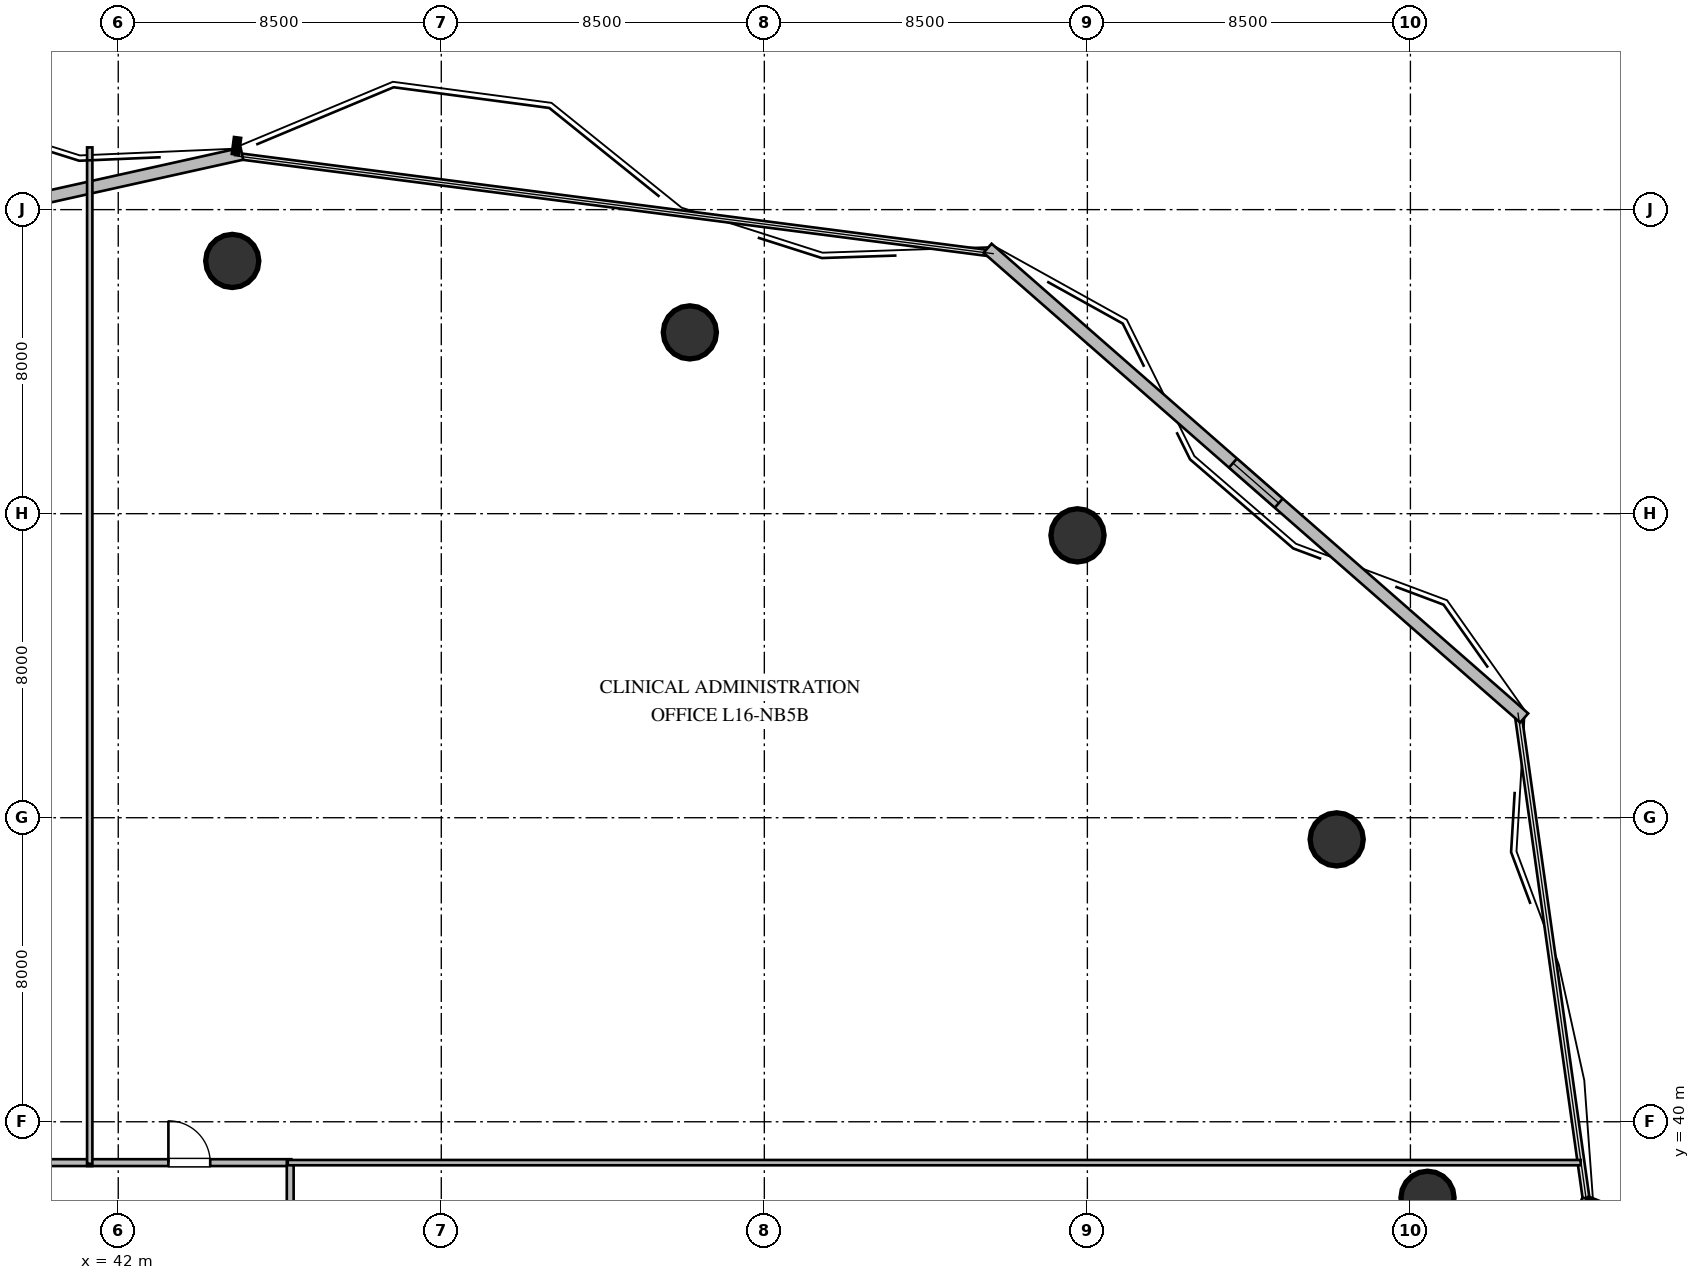
"""IFC4 building model, lengths in metres.
Left out: names, types, materials, properties, quantities, classifications, styles, units other than length and angle.
Written with IfcOpenShell. Run it as: python <this file> out.ifc"""

import sys

from ifc_helpers import new_model, si_unit, direction, frame, frame_2d, origin, origin_2d, place, context, subcontext, project, spatial, rectangle, circle, extrude, element, fill, save


model = new_model("IFC4")
c1 = context("Model", 3, precision=1e-05, world=origin(), true_north=direction((0.0, 1.0)))
c2 = subcontext(c1, "Body", "Model", "MODEL_VIEW")
j1 = project(units=[si_unit("LENGTHUNIT", "METRE"), si_unit("PLANEANGLEUNIT", "RADIAN")], contexts=[c1])
p1 = place(None, origin())
s1 = spatial("IfcSite", under=j1, at=p1, CompositionType="ELEMENT")
p2 = place(p1, origin())
s2 = spatial("IfcBuilding", under=s1, at=p2, CompositionType="ELEMENT")
p3 = place(p2, frame((0.0, 0.0, 63.6)))
s3 = spatial("IfcBuildingStorey", under=s2, at=p3, CompositionType="ELEMENT", Elevation=63.6)
for number, where, z_axis, x_axis in (
    (1, (76.45, 38.0, 0.0), (0.0, 0.0, 1.0), (1.0, 0.0, 0.0)),
    (2, (74.06, 47.43, 0.0), (0.0, 0.0, 1.0), (1.0, 0.0, 0.0)),
    (3, (67.24, 55.43, 0.0), (0.0, 0.0, 1.0), (1.0, 0.0, 0.0)),
    (4, (57.04, 60.77, 0.0), (0.0, 0.0, 1.0), (1.0, 0.0, 0.0)),
    (5, (45.0, 62.65, 0.0), (0.0, 0.0, 1.0), (1.0, 0.0, 0.0)),
):
    element("IfcColumn", number, at=place(p3, frame(where, z_axis=z_axis, x_axis=x_axis)), inside=s3, PredefinedType="COLUMN", context=c2, shape_type="SweptSolid", body=[
        extrude(circle(Radius=0.7, at=origin_2d()), origin(), (0.0, 0.0, 1.0), 3.6),
    ])
p4 = place(p3, frame((25.78, 61.144, 0.0), z_axis=(0.0, 0.0, 1.0), x_axis=(0.976206349039, 0.216843639742, 0.0)))
e6 = element("IfcWall", 6, at=p4, inside=s3, PredefinedType="STANDARD", context=c2, shape_type="SweptSolid", body=[
    extrude(rectangle(XDim=19.949, YDim=0.32, at=frame_2d((9.975, 0.0))), origin(), (0.0, 0.0, 1.0), 3.36),
])
p5 = place(p4, frame((9.175, 0.0, 1.05)))
e7 = element("IfcOpeningElement", 7, at=p5, cuts=e6, PredefinedType="OPENING", context=c2, shape_type="SweptSolid", body=[
    extrude(rectangle(XDim=1.6, YDim=1.5, at=frame_2d((0.8, 0.75))), frame((0.0, 0.17, 0.0), z_axis=(0.0, -1.0, 0.0), x_axis=(1.0, 0.0, 0.0)), (0.0, 0.0, 1.0), 0.34),
])
p6 = place(p3, frame((64.874, 62.984, 0.0), z_axis=(0.0, 0.0, 1.0), x_axis=(0.752445311183, -0.658654730249, 0.0)))
e8 = element("IfcWall", 8, at=p6, inside=s3, PredefinedType="STANDARD", context=c2, shape_type="SweptSolid", body=[
    extrude(rectangle(XDim=18.765, YDim=0.32, at=frame_2d((9.383, 0.0))), origin(), (0.0, 0.0, 1.0), 3.36),
])
p7 = place(p6, frame((8.582, 0.0, 1.05)))
e9 = element("IfcOpeningElement", 9, at=p7, cuts=e8, PredefinedType="OPENING", context=c2, shape_type="SweptSolid", body=[
    extrude(rectangle(XDim=1.6, YDim=1.5, at=frame_2d((0.8, 0.75))), frame((0.0, 0.17, 0.0), z_axis=(0.0, -1.0, 0.0), x_axis=(1.0, 0.0, 0.0)), (0.0, 0.0, 1.0), 0.34),
])
p8 = place(p3, frame((37.435, 38.925, 0.0), z_axis=(0.0, 0.0, 1.0), x_axis=(1.0, 0.0, 0.0)))
e10 = element("IfcWall", 10, at=p8, inside=s3, PredefinedType="PARTITIONING", context=c2, shape_type="SweptSolid", body=[
    extrude(rectangle(XDim=3.88, YDim=0.18, at=frame_2d((1.94, 0.0))), origin(), (0.0, 0.0, 1.0), 3.36),
])
p9 = place(p8, frame((1.39, 0.0, 0.0)))
e11 = element("IfcOpeningElement", 11, at=p9, cuts=e10, PredefinedType="OPENING", context=c2, shape_type="SweptSolid", body=[
    extrude(rectangle(XDim=1.1, YDim=2.1, at=frame_2d((0.55, 1.05))), frame((0.0, 0.1, 0.0), z_axis=(0.0, -1.0, 0.0), x_axis=(1.0, 0.0, 0.0)), (0.0, 0.0, 1.0), 0.2),
])
p10 = place(p3, frame((41.185, 38.925, 0.0), z_axis=(0.0, 0.0, 1.0), x_axis=(1.0, 0.0, 0.0)))
e12 = element("IfcWall", 12, at=p10, inside=s3, PredefinedType="PARTITIONING", context=c2, shape_type="SweptSolid", body=[
    extrude(rectangle(XDim=5.37, YDim=0.18, at=frame_2d((2.685, 0.0))), origin(), (0.0, 0.0, 1.0), 3.36),
])
p11 = place(p10, frame((2.135, 0.0, 0.0)))
e13 = element("IfcOpeningElement", 13, at=p11, cuts=e12, PredefinedType="OPENING", context=c2, shape_type="SweptSolid", body=[
    extrude(rectangle(XDim=1.1, YDim=2.1, at=frame_2d((0.55, 1.05))), frame((0.0, 0.1, 0.0), z_axis=(0.0, -1.0, 0.0), x_axis=(1.0, 0.0, 0.0)), (0.0, 0.0, 1.0), 0.2),
])
p12 = place(p3, frame((46.525, 38.955, 0.0), z_axis=(0.0, 0.0, 1.0), x_axis=(0.0, -1.0, 0.0)))
e14 = element("IfcWall", 14, at=p12, inside=s3, PredefinedType="PARTITIONING", context=c2, shape_type="SweptSolid", body=[
    extrude(rectangle(XDim=5.56, YDim=0.18, at=frame_2d((2.78, 0.0))), origin(), (0.0, 0.0, 1.0), 3.36),
])
p13 = place(p12, frame((2.23, 0.0, 0.0)))
e15 = element("IfcOpeningElement", 15, at=p13, cuts=e14, PredefinedType="OPENING", context=c2, shape_type="SweptSolid", body=[
    extrude(rectangle(XDim=1.1, YDim=2.1, at=frame_2d((0.55, 1.05))), frame((0.0, 0.1, 0.0), z_axis=(0.0, -1.0, 0.0), x_axis=(1.0, 0.0, 0.0)), (0.0, 0.0, 1.0), 0.2),
])
p14 = place(p3, frame((41.25, 65.638, 0.0), z_axis=(0.0, 0.0, 1.0), x_axis=(0.0, -1.0, 0.0)))
e16 = element("IfcWall", 16, at=p14, inside=s3, PredefinedType="PARTITIONING", context=c2, shape_type="SweptSolid", body=[
    extrude(rectangle(XDim=26.743, YDim=0.14, at=frame_2d((13.372, 0.0))), origin(), (0.0, 0.0, 1.0), 3.36),
])
p15 = place(p3, frame((80.48, 38.925, 0.0), z_axis=(0.0, 0.0, 1.0), x_axis=(-1.0, 0.0, 0.0)))
e17 = element("IfcWall", 17, at=p15, inside=s3, PredefinedType="PARTITIONING", context=c2, shape_type="SweptSolid", body=[
    extrude(rectangle(XDim=34.02, YDim=0.14, at=frame_2d((17.01, 0.0))), origin(), (0.0, 0.0, 1.0), 3.36),
])
p16 = place(p7, origin())
e18 = element("IfcWindow", 18, at=p16, inside=s3, PartitioningType="SINGLE_PANEL", PredefinedType="WINDOW", context=c2, shape_type="SweptSolid", body=[
    extrude(rectangle(XDim=1.6, YDim=1.5, at=frame_2d((0.8, 0.75))), frame((0.0, 0.03, 0.0), z_axis=(0.0, -1.0, 0.0), x_axis=(1.0, 0.0, 0.0)), (0.0, 0.0, 1.0), 0.06),
])
fill(e9, e18)
p17 = place(p11, origin())
e19 = element("IfcDoor", 19, at=p17, inside=s3, OperationType="SINGLE_SWING_LEFT", PredefinedType="DOOR", context=c2, shape_type="SweptSolid", body=[
    extrude(rectangle(XDim=1.1, YDim=2.1, at=frame_2d((0.55, 1.05))), frame((0.0, 0.025, 0.0), z_axis=(0.0, -1.0, 0.0), x_axis=(1.0, 0.0, 0.0)), (0.0, 0.0, 1.0), 0.05),
])
fill(e13, e19)
save(model, sys.argv[1])
